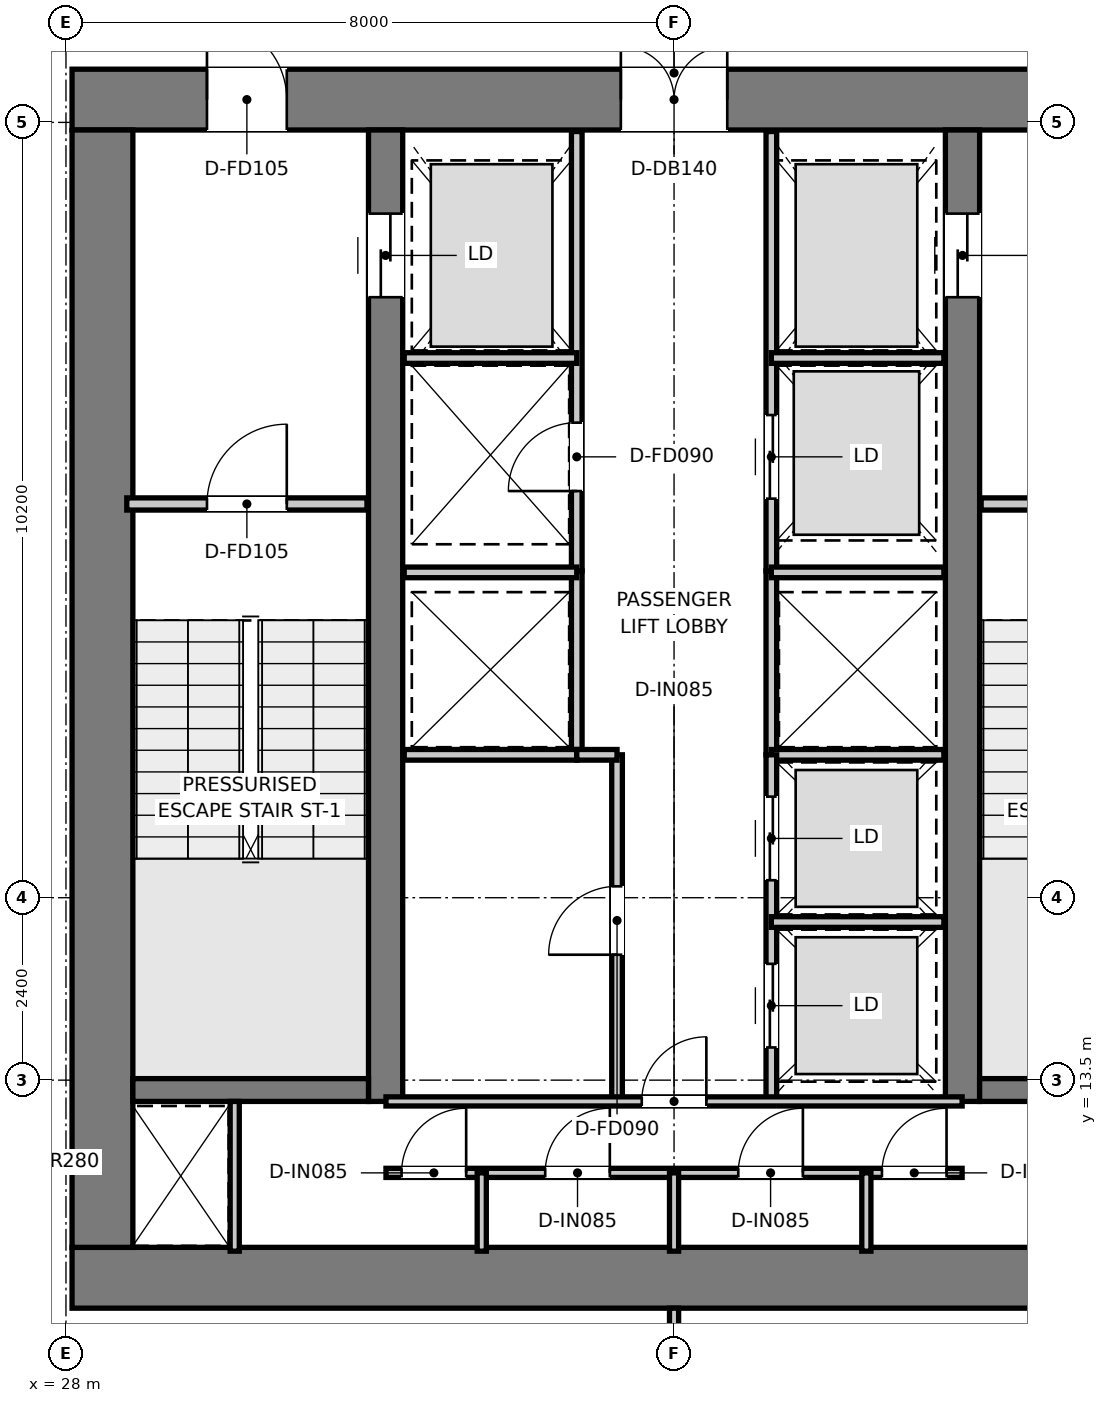
"""IFC4 building model, lengths in metres.
Left out: names, types, materials, properties, quantities, classifications, styles, units other than length and angle.
Written with IfcOpenShell. Run it as: python <this file> out.ifc"""

import sys

from ifc_helpers import new_model, si_unit, direction, frame, frame_2d, origin, place, context, subcontext, project, spatial, rectangle, extrude, element, fill, save


model = new_model("IFC4")
c1 = context("Model", 3, precision=1e-05, world=origin(), true_north=direction((0.0, 1.0)))
c2 = subcontext(c1, "Body", "Model", "MODEL_VIEW")
j1 = project(units=[si_unit("LENGTHUNIT", "METRE"), si_unit("PLANEANGLEUNIT", "RADIAN")], contexts=[c1])
p1 = place(None, origin())
s1 = spatial("IfcSite", under=j1, at=p1, CompositionType="ELEMENT")
p2 = place(p1, origin())
s2 = spatial("IfcBuilding", under=s1, at=p2, CompositionType="ELEMENT")
p3 = place(p2, frame((0.0, 0.0, 154.1)))
s3 = spatial("IfcBuildingStorey", under=s2, at=p3, CompositionType="ELEMENT", Elevation=154.1)
p4 = place(p3, frame((28.08, 10.9, 0.0), z_axis=(0.0, 0.0, 1.0), x_axis=(1.0, 0.0, 0.0)))
e1 = element("IfcWall", 1, at=p4, inside=s3, PredefinedType="SHEAR", context=c2, shape_type="SweptSolid", body=[
    extrude(rectangle(XDim=15.84, YDim=0.8, at=frame_2d((7.92, 0.0))), origin(), (0.0, 0.0, 1.0), 3.95),
])
p5 = place(p3, frame((28.08, 26.4, 0.0), z_axis=(0.0, 0.0, 1.0), x_axis=(1.0, 0.0, 0.0)))
e2 = element("IfcWall", 2, at=p5, inside=s3, PredefinedType="SHEAR", context=c2, shape_type="SweptSolid", body=[
    extrude(rectangle(XDim=15.84, YDim=0.8, at=frame_2d((7.92, 0.0))), origin(), (0.0, 0.0, 1.0), 3.95),
])
p6 = place(p5, frame((7.22, 0.0, 0.0)))
e3 = element("IfcOpeningElement", 3, at=p6, cuts=e2, PredefinedType="OPENING", context=c2, shape_type="SweptSolid", body=[
    extrude(rectangle(XDim=1.4, YDim=2.2, at=frame_2d((0.7, 1.1))), frame((0.0, 0.41, 0.0), z_axis=(0.0, -1.0, 0.0), x_axis=(1.0, 0.0, 0.0)), (0.0, 0.0, 1.0), 0.82),
])
p7 = place(p5, frame((1.775, 0.0, 0.0)))
e4 = element("IfcOpeningElement", 4, at=p7, cuts=e2, PredefinedType="OPENING", context=c2, shape_type="SweptSolid", body=[
    extrude(rectangle(XDim=1.05, YDim=2.1, at=frame_2d((0.525, 1.05))), frame((0.0, 0.41, 0.0), z_axis=(0.0, -1.0, 0.0), x_axis=(1.0, 0.0, 0.0)), (0.0, 0.0, 1.0), 0.82),
])
p8 = place(p5, frame((13.015, 0.0, 0.0)))
e5 = element("IfcOpeningElement", 5, at=p8, cuts=e2, PredefinedType="OPENING", context=c2, shape_type="SweptSolid", body=[
    extrude(rectangle(XDim=1.05, YDim=2.1, at=frame_2d((0.525, 1.05))), frame((0.0, 0.41, 0.0), z_axis=(0.0, -1.0, 0.0), x_axis=(1.0, 0.0, 0.0)), (0.0, 0.0, 1.0), 0.82),
])
p9 = place(p3, frame((28.48, 11.3, 0.0), z_axis=(0.0, 0.0, 1.0), x_axis=(0.0, 1.0, 0.0)))
e6 = element("IfcWall", 6, at=p9, inside=s3, PredefinedType="SHEAR", context=c2, shape_type="SweptSolid", body=[
    extrude(rectangle(XDim=14.7, YDim=0.8, at=frame_2d((7.35, 0.0))), origin(), (0.0, 0.0, 1.0), 3.95),
])
p10 = place(p3, frame((32.205, 13.22, 0.0), z_axis=(0.0, 0.0, 1.0), x_axis=(0.0, 1.0, 0.0)))
e7 = element("IfcWall", 7, at=p10, inside=s3, PredefinedType="SHEAR", context=c2, shape_type="SweptSolid", body=[
    extrude(rectangle(XDim=12.78, YDim=0.45, at=frame_2d((6.39, 0.0))), origin(), (0.0, 0.0, 1.0), 3.95),
])
p11 = place(p10, frame((10.58, 0.0, 0.0)))
e8 = element("IfcOpeningElement", 8, at=p11, cuts=e7, PredefinedType="OPENING", context=c2, shape_type="SweptSolid", body=[
    extrude(rectangle(XDim=1.1, YDim=2.15, at=frame_2d((0.55, 1.075))), frame((0.0, 0.235, 0.0), z_axis=(0.0, -1.0, 0.0), x_axis=(1.0, 0.0, 0.0)), (0.0, 0.0, 1.0), 0.47),
])
p12 = place(p3, frame((39.795, 13.22, 0.0), z_axis=(0.0, 0.0, 1.0), x_axis=(0.0, 1.0, 0.0)))
e9 = element("IfcWall", 9, at=p12, inside=s3, PredefinedType="SHEAR", context=c2, shape_type="SweptSolid", body=[
    extrude(rectangle(XDim=12.78, YDim=0.45, at=frame_2d((6.39, 0.0))), origin(), (0.0, 0.0, 1.0), 3.95),
])
p13 = place(p12, frame((10.58, 0.0, 0.0)))
e10 = element("IfcOpeningElement", 10, at=p13, cuts=e9, PredefinedType="OPENING", context=c2, shape_type="SweptSolid", body=[
    extrude(rectangle(XDim=1.1, YDim=2.15, at=frame_2d((0.55, 1.075))), frame((0.0, 0.235, 0.0), z_axis=(0.0, -1.0, 0.0), x_axis=(1.0, 0.0, 0.0)), (0.0, 0.0, 1.0), 0.47),
])
for number, where, z_axis, x_axis in (
    (11, (28.88, 13.37, 0.0), (0.0, 0.0, 1.0), (1.0, 0.0, 0.0)),
    (12, (40.02, 13.37, 0.0), (0.0, 0.0, 1.0), (1.0, 0.0, 0.0)),
):
    element("IfcWall", number, at=place(p3, frame(where, z_axis=z_axis, x_axis=x_axis)), inside=s3, PredefinedType="SHEAR", context=c2, shape_type="SweptSolid", body=[
        extrude(rectangle(XDim=3.1, YDim=0.3, at=frame_2d((1.55, 0.0))), origin(), (0.0, 0.0, 1.0), 3.95),
    ])
p14 = place(p3, frame((28.8, 21.08, 0.0), z_axis=(0.0, 0.0, 1.0), x_axis=(1.0, 0.0, 0.0)))
e13 = element("IfcWall", 13, at=p14, inside=s3, PredefinedType="PARTITIONING", context=c2, shape_type="SweptSolid", body=[
    extrude(rectangle(XDim=3.16, YDim=0.16, at=frame_2d((1.58, 0.0))), origin(), (0.0, 0.0, 1.0), 3.67),
])
p15 = place(p14, frame((1.055, 0.0, 0.0)))
e14 = element("IfcOpeningElement", 14, at=p15, cuts=e13, PredefinedType="OPENING", context=c2, shape_type="SweptSolid", body=[
    extrude(rectangle(XDim=1.05, YDim=2.1, at=frame_2d((0.525, 1.05))), frame((0.0, 0.09, 0.0), z_axis=(0.0, -1.0, 0.0), x_axis=(1.0, 0.0, 0.0)), (0.0, 0.0, 1.0), 0.18),
])
p16 = place(p3, frame((40.04, 21.08, 0.0), z_axis=(0.0, 0.0, 1.0), x_axis=(1.0, 0.0, 0.0)))
e15 = element("IfcWall", 15, at=p16, inside=s3, PredefinedType="PARTITIONING", context=c2, shape_type="SweptSolid", body=[
    extrude(rectangle(XDim=3.16, YDim=0.16, at=frame_2d((1.58, 0.0))), origin(), (0.0, 0.0, 1.0), 3.67),
])
p17 = place(p16, frame((1.055, 0.0, 0.0)))
e16 = element("IfcOpeningElement", 16, at=p17, cuts=e15, PredefinedType="OPENING", context=c2, shape_type="SweptSolid", body=[
    extrude(rectangle(XDim=1.05, YDim=2.1, at=frame_2d((0.525, 1.05))), frame((0.0, 0.09, 0.0), z_axis=(0.0, -1.0, 0.0), x_axis=(1.0, 0.0, 0.0)), (0.0, 0.0, 1.0), 0.18),
])
p18 = place(p3, frame((34.72, 20.2, 0.0), z_axis=(0.0, 0.0, 1.0), x_axis=(0.0, 1.0, 0.0)))
e17 = element("IfcWall", 17, at=p18, inside=s3, PredefinedType="PARTITIONING", context=c2, shape_type="SweptSolid", body=[
    extrude(rectangle(XDim=5.78, YDim=0.14, at=frame_2d((2.89, 0.0))), origin(), (0.0, 0.0, 1.0), 2.67),
])
p19 = place(p18, frame((1.05, 0.0, 0.0)))
e18 = element("IfcOpeningElement", 18, at=p19, cuts=e17, PredefinedType="OPENING", context=c2, shape_type="SweptSolid", body=[
    extrude(rectangle(XDim=0.9, YDim=2.1, at=frame_2d((0.45, 1.05))), frame((0.0, 0.08, 0.0), z_axis=(0.0, -1.0, 0.0), x_axis=(1.0, 0.0, 0.0)), (0.0, 0.0, 1.0), 0.16),
])
p20 = place(p3, frame((37.28, 20.2, 0.0), z_axis=(0.0, 0.0, 1.0), x_axis=(0.0, 1.0, 0.0)))
e19 = element("IfcWall", 19, at=p20, inside=s3, PredefinedType="PARTITIONING", context=c2, shape_type="SweptSolid", body=[
    extrude(rectangle(XDim=5.78, YDim=0.14, at=frame_2d((2.89, 0.0))), origin(), (0.0, 0.0, 1.0), 2.67),
])
p21 = place(p20, frame((0.95, 0.0, 0.0)))
e20 = element("IfcOpeningElement", 20, at=p21, cuts=e19, PredefinedType="OPENING", context=c2, shape_type="SweptSolid", body=[
    extrude(rectangle(XDim=1.1, YDim=2.15, at=frame_2d((0.55, 1.075))), frame((0.0, 0.08, 0.0), z_axis=(0.0, -1.0, 0.0), x_axis=(1.0, 0.0, 0.0)), (0.0, 0.0, 1.0), 0.16),
])
for number, where, z_axis, x_axis in (
    (21, (32.45, 23.0, 0.0), (0.0, 0.0, 1.0), (1.0, 0.0, 0.0)),
    (22, (37.28, 23.0, 0.0), (0.0, 0.0, 1.0), (1.0, 0.0, 0.0)),
):
    element("IfcWall", number, at=place(p3, frame(where, z_axis=z_axis, x_axis=x_axis)), inside=s3, PredefinedType="PARTITIONING", context=c2, shape_type="SweptSolid", body=[
        extrude(rectangle(XDim=2.27, YDim=0.14, at=frame_2d((1.135, 0.0))), origin(), (0.0, 0.0, 1.0), 2.67),
    ])
for number, where, z_axis, x_axis in (
    (23, (34.72, 17.78, 0.0), (0.0, 0.0, 1.0), (0.0, 1.0, 0.0)),
    (24, (37.28, 17.78, 0.0), (0.0, 0.0, 1.0), (0.0, 1.0, 0.0)),
):
    element("IfcWall", number, at=place(p3, frame(where, z_axis=z_axis, x_axis=x_axis)), inside=s3, PredefinedType="PARTITIONING", context=c2, shape_type="SweptSolid", body=[
        extrude(rectangle(XDim=2.42, YDim=0.14, at=frame_2d((1.21, 0.0))), origin(), (0.0, 0.0, 1.0), 3.67),
    ])
for number, where, z_axis, x_axis in (
    (25, (32.45, 17.78, 0.0), (0.0, 0.0, 1.0), (1.0, 0.0, 0.0)),
    (26, (32.45, 20.18, 0.0), (0.0, 0.0, 1.0), (1.0, 0.0, 0.0)),
    (27, (37.28, 17.78, 0.0), (0.0, 0.0, 1.0), (1.0, 0.0, 0.0)),
    (28, (37.28, 20.18, 0.0), (0.0, 0.0, 1.0), (1.0, 0.0, 0.0)),
):
    element("IfcWall", number, at=place(p3, frame(where, z_axis=z_axis, x_axis=x_axis)), inside=s3, PredefinedType="PARTITIONING", context=c2, shape_type="SweptSolid", body=[
        extrude(rectangle(XDim=2.27, YDim=0.14, at=frame_2d((1.135, 0.0))), origin(), (0.0, 0.0, 1.0), 3.67),
    ])
p22 = place(p3, frame((35.25, 13.22, 0.0), z_axis=(0.0, 0.0, 1.0), x_axis=(0.0, 1.0, 0.0)))
e29 = element("IfcWall", 29, at=p22, inside=s3, PredefinedType="PARTITIONING", context=c2, shape_type="SweptSolid", body=[
    extrude(rectangle(XDim=4.56, YDim=0.14, at=frame_2d((2.28, 0.0))), origin(), (0.0, 0.0, 1.0), 3.67),
])
p23 = place(p22, frame((1.93, 0.0, 0.0)))
e30 = element("IfcOpeningElement", 30, at=p23, cuts=e29, PredefinedType="OPENING", context=c2, shape_type="SweptSolid", body=[
    extrude(rectangle(XDim=0.9, YDim=2.1, at=frame_2d((0.45, 1.05))), frame((0.0, 0.08, 0.0), z_axis=(0.0, -1.0, 0.0), x_axis=(1.0, 0.0, 0.0)), (0.0, 0.0, 1.0), 0.16),
])
p24 = place(p3, frame((34.72, 17.78, 0.0), z_axis=(0.0, 0.0, 1.0), x_axis=(1.0, 0.0, 0.0)))
e31 = element("IfcWall", 31, at=p24, inside=s3, PredefinedType="PARTITIONING", context=c2, shape_type="SweptSolid", body=[
    extrude(rectangle(XDim=0.53, YDim=0.14, at=frame_2d((0.265, 0.0))), origin(), (0.0, 0.0, 1.0), 3.67),
])
p25 = place(p3, frame((37.28, 13.22, 0.0), z_axis=(0.0, 0.0, 1.0), x_axis=(0.0, 1.0, 0.0)))
e32 = element("IfcWall", 32, at=p25, inside=s3, PredefinedType="PARTITIONING", context=c2, shape_type="SweptSolid", body=[
    extrude(rectangle(XDim=4.56, YDim=0.14, at=frame_2d((2.28, 0.0))), origin(), (0.0, 0.0, 1.0), 3.67),
])
p26 = place(p25, frame((0.71, 0.0, 0.0)))
e33 = element("IfcOpeningElement", 33, at=p26, cuts=e32, PredefinedType="OPENING", context=c2, shape_type="SweptSolid", body=[
    extrude(rectangle(XDim=1.1, YDim=2.15, at=frame_2d((0.55, 1.075))), frame((0.0, 0.08, 0.0), z_axis=(0.0, -1.0, 0.0), x_axis=(1.0, 0.0, 0.0)), (0.0, 0.0, 1.0), 0.16),
])
p27 = place(p25, frame((2.91, 0.0, 0.0)))
e34 = element("IfcOpeningElement", 34, at=p27, cuts=e32, PredefinedType="OPENING", context=c2, shape_type="SweptSolid", body=[
    extrude(rectangle(XDim=1.1, YDim=2.15, at=frame_2d((0.55, 1.075))), frame((0.0, 0.08, 0.0), z_axis=(0.0, -1.0, 0.0), x_axis=(1.0, 0.0, 0.0)), (0.0, 0.0, 1.0), 0.16),
])
p28 = place(p3, frame((37.28, 15.58, 0.0), z_axis=(0.0, 0.0, 1.0), x_axis=(1.0, 0.0, 0.0)))
e35 = element("IfcWall", 35, at=p28, inside=s3, PredefinedType="PARTITIONING", context=c2, shape_type="SweptSolid", body=[
    extrude(rectangle(XDim=2.27, YDim=0.14, at=frame_2d((1.135, 0.0))), origin(), (0.0, 0.0, 1.0), 3.67),
])
p29 = place(p3, frame((30.22, 11.25, 0.0), z_axis=(0.0, 0.0, 1.0), x_axis=(0.0, 1.0, 0.0)))
e36 = element("IfcWall", 36, at=p29, inside=s3, PredefinedType="PARTITIONING", context=c2, shape_type="SweptSolid", body=[
    extrude(rectangle(XDim=1.97, YDim=0.12, at=frame_2d((0.985, 0.0))), origin(), (0.0, 0.0, 1.0), 3.67),
])
p30 = place(p3, frame((32.21, 13.22, 0.0), z_axis=(0.0, 0.0, 1.0), x_axis=(1.0, 0.0, 0.0)))
e37 = element("IfcWall", 37, at=p30, inside=s3, PredefinedType="PARTITIONING", context=c2, shape_type="SweptSolid", body=[
    extrude(rectangle(XDim=7.58, YDim=0.12, at=frame_2d((3.79, 0.0))), origin(), (0.0, 0.0, 1.0), 3.67),
])
p31 = place(p30, frame((3.365, 0.0, 0.0)))
e38 = element("IfcOpeningElement", 38, at=p31, cuts=e37, PredefinedType="OPENING", context=c2, shape_type="SweptSolid", body=[
    extrude(rectangle(XDim=0.85, YDim=2.1, at=frame_2d((0.425, 1.05))), frame((0.0, 0.07, 0.0), z_axis=(0.0, -1.0, 0.0), x_axis=(1.0, 0.0, 0.0)), (0.0, 0.0, 1.0), 0.14),
])
p32 = place(p3, frame((32.21, 12.28, 0.0), z_axis=(0.0, 0.0, 1.0), x_axis=(1.0, 0.0, 0.0)))
e39 = element("IfcWall", 39, at=p32, inside=s3, PredefinedType="PARTITIONING", context=c2, shape_type="SweptSolid", body=[
    extrude(rectangle(XDim=7.58, YDim=0.12, at=frame_2d((3.79, 0.0))), origin(), (0.0, 0.0, 1.0), 3.67),
])
p33 = place(p32, frame((0.205, 0.0, 0.0)))
e40 = element("IfcOpeningElement", 40, at=p33, cuts=e39, PredefinedType="OPENING", context=c2, shape_type="SweptSolid", body=[
    extrude(rectangle(XDim=0.85, YDim=2.1, at=frame_2d((0.425, 1.05))), frame((0.0, 0.07, 0.0), z_axis=(0.0, -1.0, 0.0), x_axis=(1.0, 0.0, 0.0)), (0.0, 0.0, 1.0), 0.14),
])
p34 = place(p32, frame((2.095, 0.0, 0.0)))
e41 = element("IfcOpeningElement", 41, at=p34, cuts=e39, PredefinedType="OPENING", context=c2, shape_type="SweptSolid", body=[
    extrude(rectangle(XDim=0.85, YDim=2.1, at=frame_2d((0.425, 1.05))), frame((0.0, 0.07, 0.0), z_axis=(0.0, -1.0, 0.0), x_axis=(1.0, 0.0, 0.0)), (0.0, 0.0, 1.0), 0.14),
])
p35 = place(p32, frame((4.635, 0.0, 0.0)))
e42 = element("IfcOpeningElement", 42, at=p35, cuts=e39, PredefinedType="OPENING", context=c2, shape_type="SweptSolid", body=[
    extrude(rectangle(XDim=0.85, YDim=2.1, at=frame_2d((0.425, 1.05))), frame((0.0, 0.07, 0.0), z_axis=(0.0, -1.0, 0.0), x_axis=(1.0, 0.0, 0.0)), (0.0, 0.0, 1.0), 0.14),
])
p36 = place(p32, frame((6.525, 0.0, 0.0)))
e43 = element("IfcOpeningElement", 43, at=p36, cuts=e39, PredefinedType="OPENING", context=c2, shape_type="SweptSolid", body=[
    extrude(rectangle(XDim=0.85, YDim=2.1, at=frame_2d((0.425, 1.05))), frame((0.0, 0.07, 0.0), z_axis=(0.0, -1.0, 0.0), x_axis=(1.0, 0.0, 0.0)), (0.0, 0.0, 1.0), 0.14),
])
for number, where, z_axis, x_axis in (
    (44, (33.47, 11.25, 0.0), (0.0, 0.0, 1.0), (0.0, 1.0, 0.0)),
    (45, (36.0, 11.25, 0.0), (0.0, 0.0, 1.0), (0.0, 1.0, 0.0)),
    (46, (38.53, 11.25, 0.0), (0.0, 0.0, 1.0), (0.0, 1.0, 0.0)),
):
    element("IfcWall", number, at=place(p3, frame(where, z_axis=z_axis, x_axis=x_axis)), inside=s3, PredefinedType="PARTITIONING", context=c2, shape_type="SweptSolid", body=[
        extrude(rectangle(XDim=1.03, YDim=0.12, at=frame_2d((0.515, 0.0))), origin(), (0.0, 0.0, 1.0), 3.67),
    ])
p37 = place(p3, frame((36.0, 2.084, 0.0), z_axis=(0.0, 0.0, 1.0), x_axis=(0.0, 1.0, 0.0)))
e47 = element("IfcWall", 47, at=p37, inside=s3, PredefinedType="PARTITIONING", context=c2, shape_type="SweptSolid", body=[
    extrude(rectangle(XDim=8.416, YDim=0.12, at=frame_2d((4.208, 0.0))), origin(), (0.0, 0.0, 1.0), 3.67),
])
p38 = place(p15, origin())
e48 = element("IfcDoor", 48, at=p38, inside=s3, OperationType="SINGLE_SWING_RIGHT", PredefinedType="DOOR", context=c2, shape_type="SweptSolid", body=[
    extrude(rectangle(XDim=1.05, YDim=2.1, at=frame_2d((0.525, 1.05))), frame((0.0, 0.025, 0.0), z_axis=(0.0, -1.0, 0.0), x_axis=(1.0, 0.0, 0.0)), (0.0, 0.0, 1.0), 0.05),
])
fill(e14, e48)
p39 = place(p6, origin())
e49 = element("IfcDoor", 49, at=p39, inside=s3, OperationType="DOUBLE_DOOR_SINGLE_SWING", PredefinedType="DOOR", context=c2, shape_type="SweptSolid", body=[
    extrude(rectangle(XDim=1.4, YDim=2.2, at=frame_2d((0.7, 1.1))), frame((0.0, 0.025, 0.0), z_axis=(0.0, -1.0, 0.0), x_axis=(1.0, 0.0, 0.0)), (0.0, 0.0, 1.0), 0.05),
])
fill(e3, e49)
p40 = place(p7, origin())
e50 = element("IfcDoor", 50, at=p40, inside=s3, OperationType="SINGLE_SWING_LEFT", PredefinedType="DOOR", context=c2, shape_type="SweptSolid", body=[
    extrude(rectangle(XDim=1.05, YDim=2.1, at=frame_2d((0.525, 1.05))), frame((0.0, 0.025, 0.0), z_axis=(0.0, -1.0, 0.0), x_axis=(1.0, 0.0, 0.0)), (0.0, 0.0, 1.0), 0.05),
])
fill(e4, e50)
p41 = place(p11, origin())
e51 = element("IfcDoor", 51, at=p41, inside=s3, OperationType="DOUBLE_DOOR_SLIDING", PredefinedType="DOOR", context=c2, shape_type="SweptSolid", body=[
    extrude(rectangle(XDim=1.1, YDim=2.15, at=frame_2d((0.55, 1.075))), frame((0.0, 0.025, 0.0), z_axis=(0.0, -1.0, 0.0), x_axis=(1.0, 0.0, 0.0)), (0.0, 0.0, 1.0), 0.05),
])
fill(e8, e51)
p42 = place(p13, origin())
e52 = element("IfcDoor", 52, at=p42, inside=s3, OperationType="DOUBLE_DOOR_SLIDING", PredefinedType="DOOR", context=c2, shape_type="SweptSolid", body=[
    extrude(rectangle(XDim=1.1, YDim=2.15, at=frame_2d((0.55, 1.075))), frame((0.0, 0.025, 0.0), z_axis=(0.0, -1.0, 0.0), x_axis=(1.0, 0.0, 0.0)), (0.0, 0.0, 1.0), 0.05),
])
fill(e10, e52)
p43 = place(p19, origin())
e53 = element("IfcDoor", 53, at=p43, inside=s3, OperationType="SINGLE_SWING_LEFT", PredefinedType="DOOR", context=c2, shape_type="SweptSolid", body=[
    extrude(rectangle(XDim=0.9, YDim=2.1, at=frame_2d((0.45, 1.05))), frame((0.0, 0.025, 0.0), z_axis=(0.0, -1.0, 0.0), x_axis=(1.0, 0.0, 0.0)), (0.0, 0.0, 1.0), 0.05),
])
fill(e18, e53)
p44 = place(p21, origin())
e54 = element("IfcDoor", 54, at=p44, inside=s3, OperationType="DOUBLE_DOOR_SLIDING", PredefinedType="DOOR", context=c2, shape_type="SweptSolid", body=[
    extrude(rectangle(XDim=1.1, YDim=2.15, at=frame_2d((0.55, 1.075))), frame((0.0, 0.025, 0.0), z_axis=(0.0, -1.0, 0.0), x_axis=(1.0, 0.0, 0.0)), (0.0, 0.0, 1.0), 0.05),
])
fill(e20, e54)
p45 = place(p23, origin())
e55 = element("IfcDoor", 55, at=p45, inside=s3, OperationType="SINGLE_SWING_LEFT", PredefinedType="DOOR", context=c2, shape_type="SweptSolid", body=[
    extrude(rectangle(XDim=0.9, YDim=2.1, at=frame_2d((0.45, 1.05))), frame((0.0, 0.025, 0.0), z_axis=(0.0, -1.0, 0.0), x_axis=(1.0, 0.0, 0.0)), (0.0, 0.0, 1.0), 0.05),
])
fill(e30, e55)
p46 = place(p26, origin())
e56 = element("IfcDoor", 56, at=p46, inside=s3, OperationType="DOUBLE_DOOR_SLIDING", PredefinedType="DOOR", context=c2, shape_type="SweptSolid", body=[
    extrude(rectangle(XDim=1.1, YDim=2.15, at=frame_2d((0.55, 1.075))), frame((0.0, 0.025, 0.0), z_axis=(0.0, -1.0, 0.0), x_axis=(1.0, 0.0, 0.0)), (0.0, 0.0, 1.0), 0.05),
])
fill(e33, e56)
p47 = place(p27, origin())
e57 = element("IfcDoor", 57, at=p47, inside=s3, OperationType="DOUBLE_DOOR_SLIDING", PredefinedType="DOOR", context=c2, shape_type="SweptSolid", body=[
    extrude(rectangle(XDim=1.1, YDim=2.15, at=frame_2d((0.55, 1.075))), frame((0.0, 0.025, 0.0), z_axis=(0.0, -1.0, 0.0), x_axis=(1.0, 0.0, 0.0)), (0.0, 0.0, 1.0), 0.05),
])
fill(e34, e57)
p48 = place(p31, origin())
e58 = element("IfcDoor", 58, at=p48, inside=s3, OperationType="SINGLE_SWING_RIGHT", PredefinedType="DOOR", context=c2, shape_type="SweptSolid", body=[
    extrude(rectangle(XDim=0.85, YDim=2.1, at=frame_2d((0.425, 1.05))), frame((0.0, 0.025, 0.0), z_axis=(0.0, -1.0, 0.0), x_axis=(1.0, 0.0, 0.0)), (0.0, 0.0, 1.0), 0.05),
])
fill(e38, e58)
p49 = place(p33, origin())
e59 = element("IfcDoor", 59, at=p49, inside=s3, OperationType="SINGLE_SWING_RIGHT", PredefinedType="DOOR", context=c2, shape_type="SweptSolid", body=[
    extrude(rectangle(XDim=0.85, YDim=2.1, at=frame_2d((0.425, 1.05))), frame((0.0, 0.025, 0.0), z_axis=(0.0, -1.0, 0.0), x_axis=(1.0, 0.0, 0.0)), (0.0, 0.0, 1.0), 0.05),
])
fill(e40, e59)
p50 = place(p34, origin())
e60 = element("IfcDoor", 60, at=p50, inside=s3, OperationType="SINGLE_SWING_RIGHT", PredefinedType="DOOR", context=c2, shape_type="SweptSolid", body=[
    extrude(rectangle(XDim=0.85, YDim=2.1, at=frame_2d((0.425, 1.05))), frame((0.0, 0.025, 0.0), z_axis=(0.0, -1.0, 0.0), x_axis=(1.0, 0.0, 0.0)), (0.0, 0.0, 1.0), 0.05),
])
fill(e41, e60)
p51 = place(p35, origin())
e61 = element("IfcDoor", 61, at=p51, inside=s3, OperationType="SINGLE_SWING_RIGHT", PredefinedType="DOOR", context=c2, shape_type="SweptSolid", body=[
    extrude(rectangle(XDim=0.85, YDim=2.1, at=frame_2d((0.425, 1.05))), frame((0.0, 0.025, 0.0), z_axis=(0.0, -1.0, 0.0), x_axis=(1.0, 0.0, 0.0)), (0.0, 0.0, 1.0), 0.05),
])
fill(e42, e61)
p52 = place(p36, origin())
e62 = element("IfcDoor", 62, at=p52, inside=s3, OperationType="SINGLE_SWING_RIGHT", PredefinedType="DOOR", context=c2, shape_type="SweptSolid", body=[
    extrude(rectangle(XDim=0.85, YDim=2.1, at=frame_2d((0.425, 1.05))), frame((0.0, 0.025, 0.0), z_axis=(0.0, -1.0, 0.0), x_axis=(1.0, 0.0, 0.0)), (0.0, 0.0, 1.0), 0.05),
])
fill(e43, e62)
save(model, sys.argv[1])
